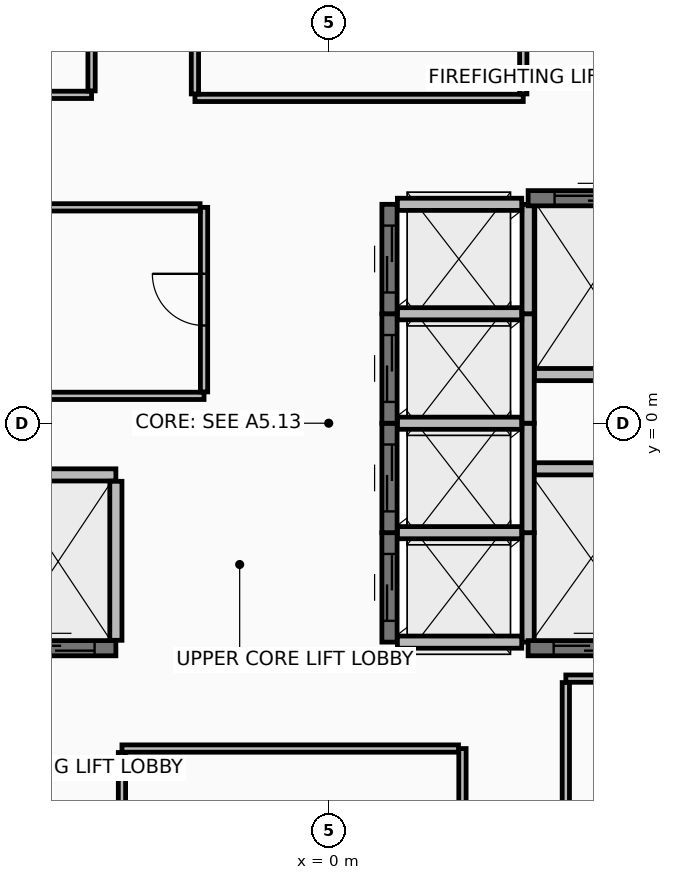
"""IFC4 building model, lengths in metres.
Left out: names, types, materials, properties, quantities, classifications, styles, units other than length and angle.
Written with IfcOpenShell. Run it as: python <this file> out.ifc"""

import sys

from ifc_helpers import new_model, si_unit, direction, frame, frame_2d, origin, place, context, subcontext, project, spatial, rectangle, extrude, element, fill, save


model = new_model("IFC4")
c1 = context("Model", 3, precision=1e-05, world=origin(), true_north=direction((0.0, 1.0)))
c2 = subcontext(c1, "Body", "Model", "MODEL_VIEW")
j1 = project(units=[si_unit("LENGTHUNIT", "METRE"), si_unit("PLANEANGLEUNIT", "RADIAN")], contexts=[c1])
p1 = place(None, origin())
s1 = spatial("IfcSite", under=j1, at=p1, CompositionType="ELEMENT")
p2 = place(p1, origin())
s2 = spatial("IfcBuilding", under=s1, at=p2, CompositionType="ELEMENT")
p3 = place(p2, frame((0.0, 0.0, 290.7)))
s3 = spatial("IfcBuildingStorey", under=s2, at=p3, CompositionType="ELEMENT", Elevation=290.7)
p4 = place(p3, frame((1.0, -3.6, 0.0), z_axis=(0.0, 0.0, 1.0), x_axis=(0.0, 1.0, 0.0)))
e1 = element("IfcWall", 1, at=p4, inside=s3, PredefinedType="SHEAR", context=c2, shape_type="SweptSolid", body=[
    extrude(rectangle(XDim=1.8, YDim=0.25, at=frame_2d((0.9, 0.0))), origin(), (0.0, 0.0, 1.0), 3.465),
])
p5 = place(p4, frame((0.35, 0.0, 0.0)))
e2 = element("IfcOpeningElement", 2, at=p5, cuts=e1, PredefinedType="OPENING", context=c2, shape_type="SweptSolid", body=[
    extrude(rectangle(XDim=1.1, YDim=2.2, at=frame_2d((0.55, 1.1))), frame((0.0, 0.135, 0.0), z_axis=(0.0, -1.0, 0.0), x_axis=(1.0, 0.0, 0.0)), (0.0, 0.0, 1.0), 0.27),
])
p6 = place(p3, frame((3.28, -3.6, 0.0), z_axis=(0.0, 0.0, 1.0), x_axis=(0.0, 1.0, 0.0)))
e3 = element("IfcWall", 3, at=p6, inside=s3, PredefinedType="PARTITIONING", context=c2, shape_type="SweptSolid", body=[
    extrude(rectangle(XDim=1.8, YDim=0.2, at=frame_2d((0.9, 0.0))), origin(), (0.0, 0.0, 1.0), 3.465),
])
for number, where, z_axis, x_axis in (
    (4, (1.13, -3.6, 0.0), (0.0, 0.0, 1.0), (1.0, 0.0, 0.0)),
    (5, (1.13, -1.8, 0.0), (0.0, 0.0, 1.0), (1.0, 0.0, 0.0)),
):
    element("IfcWall", number, at=place(p3, frame(where, z_axis=z_axis, x_axis=x_axis)), inside=s3, PredefinedType="PARTITIONING", context=c2, shape_type="SweptSolid", body=[
        extrude(rectangle(XDim=2.045, YDim=0.2, at=frame_2d((1.022, 0.0))), origin(), (0.0, 0.0, 1.0), 3.465),
    ])
p7 = place(p3, frame((1.0, -1.8, 0.0), z_axis=(0.0, 0.0, 1.0), x_axis=(0.0, 1.0, 0.0)))
e6 = element("IfcWall", 6, at=p7, inside=s3, PredefinedType="SHEAR", context=c2, shape_type="SweptSolid", body=[
    extrude(rectangle(XDim=1.8, YDim=0.25, at=frame_2d((0.9, 0.0))), origin(), (0.0, 0.0, 1.0), 3.465),
])
p8 = place(p7, frame((0.35, 0.0, 0.0)))
e7 = element("IfcOpeningElement", 7, at=p8, cuts=e6, PredefinedType="OPENING", context=c2, shape_type="SweptSolid", body=[
    extrude(rectangle(XDim=1.1, YDim=2.2, at=frame_2d((0.55, 1.1))), frame((0.0, 0.135, 0.0), z_axis=(0.0, -1.0, 0.0), x_axis=(1.0, 0.0, 0.0)), (0.0, 0.0, 1.0), 0.27),
])
p9 = place(p3, frame((3.28, -1.8, 0.0), z_axis=(0.0, 0.0, 1.0), x_axis=(0.0, 1.0, 0.0)))
e8 = element("IfcWall", 8, at=p9, inside=s3, PredefinedType="PARTITIONING", context=c2, shape_type="SweptSolid", body=[
    extrude(rectangle(XDim=1.8, YDim=0.2, at=frame_2d((0.9, 0.0))), origin(), (0.0, 0.0, 1.0), 3.465),
])
p10 = place(p3, frame((1.13, 0.0, 0.0), z_axis=(0.0, 0.0, 1.0), x_axis=(1.0, 0.0, 0.0)))
e9 = element("IfcWall", 9, at=p10, inside=s3, PredefinedType="PARTITIONING", context=c2, shape_type="SweptSolid", body=[
    extrude(rectangle(XDim=2.045, YDim=0.2, at=frame_2d((1.022, 0.0))), origin(), (0.0, 0.0, 1.0), 3.465),
])
p11 = place(p3, frame((1.0, 0.0, 0.0), z_axis=(0.0, 0.0, 1.0), x_axis=(0.0, 1.0, 0.0)))
e10 = element("IfcWall", 10, at=p11, inside=s3, PredefinedType="SHEAR", context=c2, shape_type="SweptSolid", body=[
    extrude(rectangle(XDim=1.8, YDim=0.25, at=frame_2d((0.9, 0.0))), origin(), (0.0, 0.0, 1.0), 3.465),
])
p12 = place(p11, frame((0.35, 0.0, 0.0)))
e11 = element("IfcOpeningElement", 11, at=p12, cuts=e10, PredefinedType="OPENING", context=c2, shape_type="SweptSolid", body=[
    extrude(rectangle(XDim=1.1, YDim=2.2, at=frame_2d((0.55, 1.1))), frame((0.0, 0.135, 0.0), z_axis=(0.0, -1.0, 0.0), x_axis=(1.0, 0.0, 0.0)), (0.0, 0.0, 1.0), 0.27),
])
p13 = place(p3, frame((3.28, 0.0, 0.0), z_axis=(0.0, 0.0, 1.0), x_axis=(0.0, 1.0, 0.0)))
e12 = element("IfcWall", 12, at=p13, inside=s3, PredefinedType="PARTITIONING", context=c2, shape_type="SweptSolid", body=[
    extrude(rectangle(XDim=1.8, YDim=0.2, at=frame_2d((0.9, 0.0))), origin(), (0.0, 0.0, 1.0), 3.465),
])
p14 = place(p3, frame((1.13, 1.8, 0.0), z_axis=(0.0, 0.0, 1.0), x_axis=(1.0, 0.0, 0.0)))
e13 = element("IfcWall", 13, at=p14, inside=s3, PredefinedType="PARTITIONING", context=c2, shape_type="SweptSolid", body=[
    extrude(rectangle(XDim=2.045, YDim=0.2, at=frame_2d((1.022, 0.0))), origin(), (0.0, 0.0, 1.0), 3.465),
])
p15 = place(p3, frame((1.0, 1.8, 0.0), z_axis=(0.0, 0.0, 1.0), x_axis=(0.0, 1.0, 0.0)))
e14 = element("IfcWall", 14, at=p15, inside=s3, PredefinedType="SHEAR", context=c2, shape_type="SweptSolid", body=[
    extrude(rectangle(XDim=1.8, YDim=0.25, at=frame_2d((0.9, 0.0))), origin(), (0.0, 0.0, 1.0), 3.465),
])
p16 = place(p15, frame((0.35, 0.0, 0.0)))
e15 = element("IfcOpeningElement", 15, at=p16, cuts=e14, PredefinedType="OPENING", context=c2, shape_type="SweptSolid", body=[
    extrude(rectangle(XDim=1.1, YDim=2.2, at=frame_2d((0.55, 1.1))), frame((0.0, 0.135, 0.0), z_axis=(0.0, -1.0, 0.0), x_axis=(1.0, 0.0, 0.0)), (0.0, 0.0, 1.0), 0.27),
])
p17 = place(p3, frame((3.28, 1.8, 0.0), z_axis=(0.0, 0.0, 1.0), x_axis=(0.0, 1.0, 0.0)))
e16 = element("IfcWall", 16, at=p17, inside=s3, PredefinedType="PARTITIONING", context=c2, shape_type="SweptSolid", body=[
    extrude(rectangle(XDim=1.8, YDim=0.2, at=frame_2d((0.9, 0.0))), origin(), (0.0, 0.0, 1.0), 3.465),
])
p18 = place(p3, frame((1.13, 3.6, 0.0), z_axis=(0.0, 0.0, 1.0), x_axis=(1.0, 0.0, 0.0)))
e17 = element("IfcWall", 17, at=p18, inside=s3, PredefinedType="PARTITIONING", context=c2, shape_type="SweptSolid", body=[
    extrude(rectangle(XDim=2.045, YDim=0.2, at=frame_2d((1.022, 0.0))), origin(), (0.0, 0.0, 1.0), 2.76),
])
p19 = place(p3, frame((-5.4, -3.7, 0.0), z_axis=(0.0, 0.0, 1.0), x_axis=(1.0, 0.0, 0.0)))
e18 = element("IfcWall", 18, at=p19, inside=s3, PredefinedType="SHEAR", context=c2, shape_type="SweptSolid", body=[
    extrude(rectangle(XDim=1.9, YDim=0.25, at=frame_2d((0.95, 0.0))), origin(), (0.0, 0.0, 1.0), 3.465),
])
p20 = place(p19, frame((0.35, 0.0, 0.0)))
e19 = element("IfcOpeningElement", 19, at=p20, cuts=e18, PredefinedType="OPENING", context=c2, shape_type="SweptSolid", body=[
    extrude(rectangle(XDim=1.2, YDim=2.2, at=frame_2d((0.6, 1.1))), frame((0.0, 0.135, 0.0), z_axis=(0.0, -1.0, 0.0), x_axis=(1.0, 0.0, 0.0)), (0.0, 0.0, 1.0), 0.27),
])
p21 = place(p3, frame((-5.27, -0.85, 0.0), z_axis=(0.0, 0.0, 1.0), x_axis=(1.0, 0.0, 0.0)))
e20 = element("IfcWall", 20, at=p21, inside=s3, PredefinedType="PARTITIONING", context=c2, shape_type="SweptSolid", body=[
    extrude(rectangle(XDim=1.77, YDim=0.2, at=frame_2d((0.885, 0.0))), origin(), (0.0, 0.0, 1.0), 3.465),
])
p22 = place(p3, frame((-3.5, -3.57, 0.0), z_axis=(0.0, 0.0, 1.0), x_axis=(0.0, 1.0, 0.0)))
e21 = element("IfcWall", 21, at=p22, inside=s3, PredefinedType="PARTITIONING", context=c2, shape_type="SweptSolid", body=[
    extrude(rectangle(XDim=2.615, YDim=0.2, at=frame_2d((1.308, 0.0))), origin(), (0.0, 0.0, 1.0), 3.465),
])
p23 = place(p3, frame((3.28, 3.7, 0.0), z_axis=(0.0, 0.0, 1.0), x_axis=(1.0, 0.0, 0.0)))
e22 = element("IfcWall", 22, at=p23, inside=s3, PredefinedType="SHEAR", context=c2, shape_type="SweptSolid", body=[
    extrude(rectangle(XDim=2.07, YDim=0.25, at=frame_2d((1.035, 0.0))), origin(), (0.0, 0.0, 1.0), 3.465),
])
p24 = place(p23, frame((0.435, 0.0, 0.0)))
e23 = element("IfcOpeningElement", 23, at=p24, cuts=e22, PredefinedType="OPENING", context=c2, shape_type="SweptSolid", body=[
    extrude(rectangle(XDim=1.2, YDim=2.2, at=frame_2d((0.6, 1.1))), frame((0.0, 0.135, 0.0), z_axis=(0.0, -1.0, 0.0), x_axis=(1.0, 0.0, 0.0)), (0.0, 0.0, 1.0), 0.27),
])
p25 = place(p3, frame((3.385, 0.8, 0.0), z_axis=(0.0, 0.0, 1.0), x_axis=(1.0, 0.0, 0.0)))
e24 = element("IfcWall", 24, at=p25, inside=s3, PredefinedType="PARTITIONING", context=c2, shape_type="SweptSolid", body=[
    extrude(rectangle(XDim=1.835, YDim=0.2, at=frame_2d((0.917, 0.0))), origin(), (0.0, 0.0, 1.0), 3.465),
])
p26 = place(p3, frame((3.28, -3.7, 0.0), z_axis=(0.0, 0.0, 1.0), x_axis=(1.0, 0.0, 0.0)))
e25 = element("IfcWall", 25, at=p26, inside=s3, PredefinedType="SHEAR", context=c2, shape_type="SweptSolid", body=[
    extrude(rectangle(XDim=1.94, YDim=0.25, at=frame_2d((0.97, 0.0))), origin(), (0.0, 0.0, 1.0), 3.465),
])
p27 = place(p26, frame((0.42, 0.0, 0.0)))
e26 = element("IfcOpeningElement", 26, at=p27, cuts=e25, PredefinedType="OPENING", context=c2, shape_type="SweptSolid", body=[
    extrude(rectangle(XDim=1.1, YDim=2.2, at=frame_2d((0.55, 1.1))), frame((0.0, 0.135, 0.0), z_axis=(0.0, -1.0, 0.0), x_axis=(1.0, 0.0, 0.0)), (0.0, 0.0, 1.0), 0.27),
])
p28 = place(p3, frame((3.385, -0.75, 0.0), z_axis=(0.0, 0.0, 1.0), x_axis=(1.0, 0.0, 0.0)))
e27 = element("IfcWall", 27, at=p28, inside=s3, PredefinedType="PARTITIONING", context=c2, shape_type="SweptSolid", body=[
    extrude(rectangle(XDim=1.835, YDim=0.2, at=frame_2d((0.917, 0.0))), origin(), (0.0, 0.0, 1.0), 3.465),
])
p29 = place(p3, frame((-5.22, 0.45, 0.0), z_axis=(0.0, 0.0, 1.0), x_axis=(1.0, 0.0, 0.0)))
e28 = element("IfcWall", 28, at=p29, inside=s3, PredefinedType="PARTITIONING", context=c2, shape_type="SweptSolid", body=[
    extrude(rectangle(XDim=3.17, YDim=0.12, at=frame_2d((1.585, 0.0))), origin(), (0.0, 0.0, 1.0), 3.465),
])
p30 = place(p3, frame((-2.05, 0.515, 0.0), z_axis=(0.0, 0.0, 1.0), x_axis=(0.0, 1.0, 0.0)))
e29 = element("IfcWall", 29, at=p30, inside=s3, PredefinedType="PARTITIONING", context=c2, shape_type="SweptSolid", body=[
    extrude(rectangle(XDim=3.035, YDim=0.12, at=frame_2d((1.518, 0.0))), origin(), (0.0, 0.0, 1.0), 3.465),
])
p31 = place(p30, frame((1.092, 0.0, 0.0)))
e30 = element("IfcOpeningElement", 30, at=p31, cuts=e29, PredefinedType="OPENING", context=c2, shape_type="SweptSolid", body=[
    extrude(rectangle(XDim=0.85, YDim=2.1, at=frame_2d((0.425, 1.05))), frame((0.0, 0.07, 0.0), z_axis=(0.0, -1.0, 0.0), x_axis=(1.0, 0.0, 0.0)), (0.0, 0.0, 1.0), 0.14),
])
p32 = place(p3, frame((-2.115, 3.55, 0.0), z_axis=(0.0, 0.0, 1.0), x_axis=(-1.0, 0.0, 0.0)))
e31 = element("IfcWall", 31, at=p32, inside=s3, PredefinedType="PARTITIONING", context=c2, shape_type="SweptSolid", body=[
    extrude(rectangle(XDim=3.105, YDim=0.12, at=frame_2d((1.552, 0.0))), origin(), (0.0, 0.0, 1.0), 3.465),
])
p33 = place(p3, frame((2.2, -7.42, 0.0), z_axis=(0.0, 0.0, 1.0), x_axis=(0.0, 1.0, 0.0)))
e32 = element("IfcWall", 32, at=p33, inside=s3, PredefinedType="PARTITIONING", context=c2, shape_type="SweptSolid", body=[
    extrude(rectangle(XDim=2.07, YDim=0.12, at=frame_2d((1.035, 0.0))), origin(), (0.0, 0.0, 1.0), 2.76),
])
p34 = place(p3, frame((2.135, -5.35, 0.0), z_axis=(0.0, 0.0, 1.0), x_axis=(-1.0, 0.0, 0.0)))
e33 = element("IfcWall", 33, at=p34, inside=s3, PredefinedType="PARTITIONING", context=c2, shape_type="SweptSolid", body=[
    extrude(rectangle(XDim=5.535, YDim=0.12, at=frame_2d((2.768, 0.0))), origin(), (0.0, 0.0, 1.0), 2.76),
])
p35 = place(p3, frame((-3.4, -5.415, 0.0), z_axis=(0.0, 0.0, 1.0), x_axis=(0.0, -1.0, 0.0)))
e34 = element("IfcWall", 34, at=p35, inside=s3, PredefinedType="PARTITIONING", context=c2, shape_type="SweptSolid", body=[
    extrude(rectangle(XDim=2.8, YDim=0.12, at=frame_2d((1.4, 0.0))), origin(), (0.0, 0.0, 1.0), 2.76),
])
p36 = place(p3, frame((-2.2, 5.35, 0.0), z_axis=(0.0, 0.0, 1.0), x_axis=(1.0, 0.0, 0.0)))
e35 = element("IfcWall", 35, at=p36, inside=s3, PredefinedType="PARTITIONING", context=c2, shape_type="SweptSolid", body=[
    extrude(rectangle(XDim=5.4, YDim=0.12, at=frame_2d((2.7, 0.0))), origin(), (0.0, 0.0, 1.0), 2.76),
])
p37 = place(p3, frame((3.2, 5.415, 0.0), z_axis=(0.0, 0.0, 1.0), x_axis=(0.0, 1.0, 0.0)))
e36 = element("IfcWall", 36, at=p37, inside=s3, PredefinedType="PARTITIONING", context=c2, shape_type="SweptSolid", body=[
    extrude(rectangle(XDim=2.8, YDim=0.12, at=frame_2d((1.4, 0.0))), origin(), (0.0, 0.0, 1.0), 2.76),
])
p38 = place(p3, frame((-2.2, 7.42, 0.0), z_axis=(0.0, 0.0, 1.0), x_axis=(0.0, -1.0, 0.0)))
e37 = element("IfcWall", 37, at=p38, inside=s3, PredefinedType="PARTITIONING", context=c2, shape_type="SweptSolid", body=[
    extrude(rectangle(XDim=2.005, YDim=0.12, at=frame_2d((1.002, 0.0))), origin(), (0.0, 0.0, 1.0), 2.76),
])
p39 = place(p3, frame((-6.2, 5.4, 0.0), z_axis=(0.0, 0.0, 1.0), x_axis=(1.0, 0.0, 0.0)))
e38 = element("IfcWall", 38, at=p39, inside=s3, PredefinedType="PARTITIONING", context=c2, shape_type="SweptSolid", body=[
    extrude(rectangle(XDim=2.3, YDim=0.12, at=frame_2d((1.15, 0.0))), origin(), (0.0, 0.0, 1.0), 3.465),
])
p40 = place(p3, frame((-3.9, 5.465, 0.0), z_axis=(0.0, 0.0, 1.0), x_axis=(0.0, 1.0, 0.0)))
e39 = element("IfcWall", 39, at=p40, inside=s3, PredefinedType="PARTITIONING", context=c2, shape_type="SweptSolid", body=[
    extrude(rectangle(XDim=2.75, YDim=0.12, at=frame_2d((1.375, 0.0))), origin(), (0.0, 0.0, 1.0), 2.76),
])
p41 = place(p3, frame((7.735, -4.2, 0.0), z_axis=(0.0, 0.0, 1.0), x_axis=(-1.0, 0.0, 0.0)))
e40 = element("IfcWall", 40, at=p41, inside=s3, PredefinedType="PARTITIONING", context=c2, shape_type="SweptSolid", body=[
    extrude(rectangle(XDim=3.835, YDim=0.12, at=frame_2d((1.917, 0.0))), origin(), (0.0, 0.0, 1.0), 3.465),
])
p42 = place(p3, frame((3.9, -4.265, 0.0), z_axis=(0.0, 0.0, 1.0), x_axis=(0.0, -1.0, 0.0)))
e41 = element("IfcWall", 41, at=p42, inside=s3, PredefinedType="PARTITIONING", context=c2, shape_type="SweptSolid", body=[
    extrude(rectangle(XDim=3.95, YDim=0.12, at=frame_2d((1.975, 0.0))), origin(), (0.0, 0.0, 1.0), 2.76),
])
p43 = place(p5, origin())
e42 = element("IfcDoor", 42, at=p43, inside=s3, OperationType="SLIDING_TO_LEFT", PredefinedType="DOOR", context=c2, shape_type="SweptSolid", body=[
    extrude(rectangle(XDim=1.1, YDim=2.2, at=frame_2d((0.55, 1.1))), frame((0.0, 0.025, 0.0), z_axis=(0.0, -1.0, 0.0), x_axis=(1.0, 0.0, 0.0)), (0.0, 0.0, 1.0), 0.05),
])
fill(e2, e42)
p44 = place(p8, origin())
e43 = element("IfcDoor", 43, at=p44, inside=s3, OperationType="SLIDING_TO_LEFT", PredefinedType="DOOR", context=c2, shape_type="SweptSolid", body=[
    extrude(rectangle(XDim=1.1, YDim=2.2, at=frame_2d((0.55, 1.1))), frame((0.0, 0.025, 0.0), z_axis=(0.0, -1.0, 0.0), x_axis=(1.0, 0.0, 0.0)), (0.0, 0.0, 1.0), 0.05),
])
fill(e7, e43)
p45 = place(p12, origin())
e44 = element("IfcDoor", 44, at=p45, inside=s3, OperationType="SLIDING_TO_LEFT", PredefinedType="DOOR", context=c2, shape_type="SweptSolid", body=[
    extrude(rectangle(XDim=1.1, YDim=2.2, at=frame_2d((0.55, 1.1))), frame((0.0, 0.025, 0.0), z_axis=(0.0, -1.0, 0.0), x_axis=(1.0, 0.0, 0.0)), (0.0, 0.0, 1.0), 0.05),
])
fill(e11, e44)
p46 = place(p16, origin())
e45 = element("IfcDoor", 45, at=p46, inside=s3, OperationType="SLIDING_TO_LEFT", PredefinedType="DOOR", context=c2, shape_type="SweptSolid", body=[
    extrude(rectangle(XDim=1.1, YDim=2.2, at=frame_2d((0.55, 1.1))), frame((0.0, 0.025, 0.0), z_axis=(0.0, -1.0, 0.0), x_axis=(1.0, 0.0, 0.0)), (0.0, 0.0, 1.0), 0.05),
])
fill(e15, e45)
p47 = place(p20, origin())
e46 = element("IfcDoor", 46, at=p47, inside=s3, OperationType="SLIDING_TO_RIGHT", PredefinedType="DOOR", context=c2, shape_type="SweptSolid", body=[
    extrude(rectangle(XDim=1.2, YDim=2.2, at=frame_2d((0.6, 1.1))), frame((0.0, 0.025, 0.0), z_axis=(0.0, -1.0, 0.0), x_axis=(1.0, 0.0, 0.0)), (0.0, 0.0, 1.0), 0.05),
])
fill(e19, e46)
p48 = place(p24, origin())
e47 = element("IfcDoor", 47, at=p48, inside=s3, OperationType="SLIDING_TO_RIGHT", PredefinedType="DOOR", context=c2, shape_type="SweptSolid", body=[
    extrude(rectangle(XDim=1.2, YDim=2.2, at=frame_2d((0.6, 1.1))), frame((0.0, 0.025, 0.0), z_axis=(0.0, -1.0, 0.0), x_axis=(1.0, 0.0, 0.0)), (0.0, 0.0, 1.0), 0.05),
])
fill(e23, e47)
p49 = place(p27, origin())
e48 = element("IfcDoor", 48, at=p49, inside=s3, OperationType="SLIDING_TO_LEFT", PredefinedType="DOOR", context=c2, shape_type="SweptSolid", body=[
    extrude(rectangle(XDim=1.1, YDim=2.2, at=frame_2d((0.55, 1.1))), frame((0.0, 0.025, 0.0), z_axis=(0.0, -1.0, 0.0), x_axis=(1.0, 0.0, 0.0)), (0.0, 0.0, 1.0), 0.05),
])
fill(e26, e48)
p50 = place(p31, frame((0.85, 0.0, 0.0), z_axis=(0.0, 0.0, 1.0), x_axis=(-1.0, 0.0, 0.0)))
e49 = element("IfcDoor", 49, at=p50, inside=s3, OperationType="SINGLE_SWING_RIGHT", PredefinedType="DOOR", context=c2, shape_type="SweptSolid", body=[
    extrude(rectangle(XDim=0.85, YDim=2.1, at=frame_2d((0.425, 1.05))), frame((0.0, 0.025, 0.0), z_axis=(0.0, -1.0, 0.0), x_axis=(1.0, 0.0, 0.0)), (0.0, 0.0, 1.0), 0.05),
])
fill(e30, e49)
save(model, sys.argv[1])
